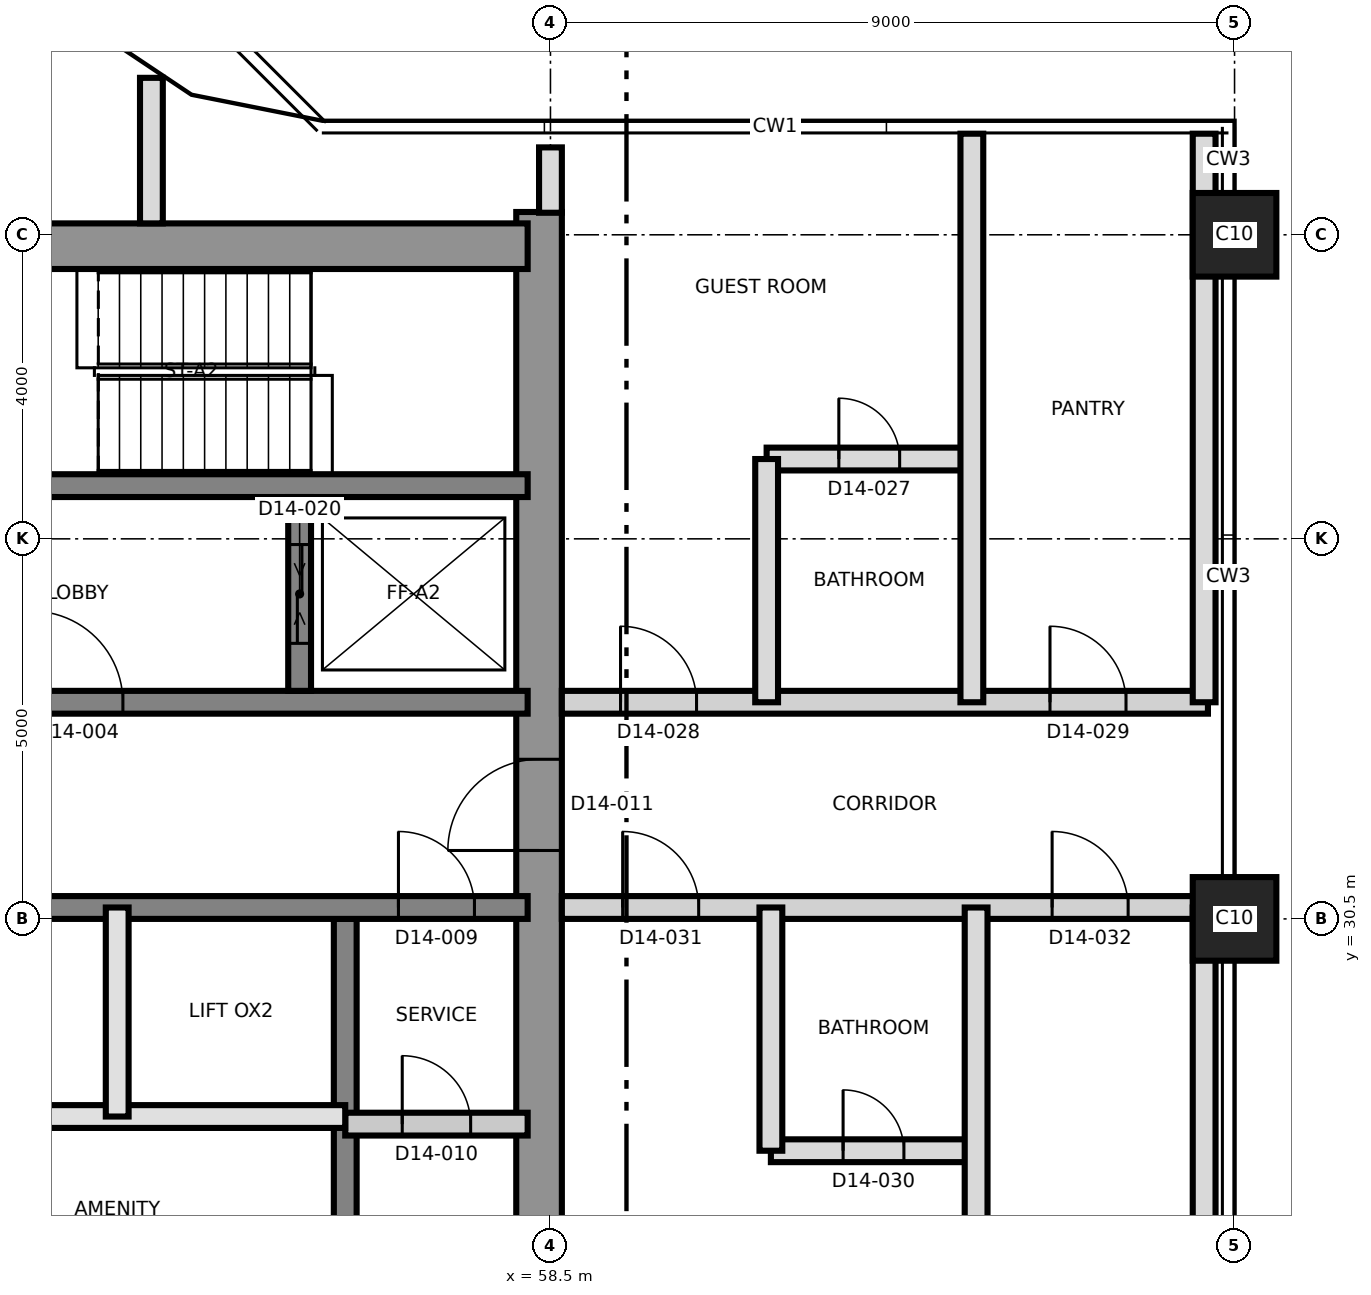
"""IFC4 building model, lengths in metres.
Left out: names, types, materials, properties, quantities, classifications, styles, units other than length and angle.
Written with IfcOpenShell. Run it as: python <this file> out.ifc"""

import sys

from ifc_helpers import new_model, si_unit, direction, frame, frame_2d, origin, origin_2d, place, context, subcontext, project, spatial, rectangle, extrude, element, fill, save


model = new_model("IFC4")
c1 = context("Model", 3, precision=1e-05, world=origin(), true_north=direction((0.0, 1.0)))
c2 = subcontext(c1, "Body", "Model", "MODEL_VIEW")
j1 = project(units=[si_unit("LENGTHUNIT", "METRE"), si_unit("PLANEANGLEUNIT", "RADIAN")], contexts=[c1])
p1 = place(None, origin())
s1 = spatial("IfcSite", under=j1, at=p1, CompositionType="ELEMENT")
p2 = place(p1, origin())
s2 = spatial("IfcBuilding", under=s1, at=p2, CompositionType="ELEMENT")
p3 = place(p2, frame((0.0, 0.0, 149.6)))
s3 = spatial("IfcBuildingStorey", under=s2, at=p3, CompositionType="ELEMENT", Elevation=149.6)
p4 = place(p3, frame((58.35, 21.2, 0.0), z_axis=(0.0, 0.0, 1.0), x_axis=(0.0, 1.0, 0.0)))
e1 = element("IfcWall", 1, at=p4, inside=s3, PredefinedType="SHEAR", context=c2, shape_type="SweptSolid", body=[
    extrude(rectangle(XDim=18.6, YDim=0.6, at=frame_2d((9.3, 0.0))), origin(), (0.0, 0.0, 1.0), 3.7),
])
p5 = place(p4, frame((10.2, 0.0, 0.0)))
e2 = element("IfcOpeningElement", 2, at=p5, cuts=e1, PredefinedType="OPENING", context=c2, shape_type="SweptSolid", body=[
    extrude(rectangle(XDim=1.2, YDim=2.1, at=frame_2d((0.6, 1.05))), frame((0.0, 0.31, 0.0), z_axis=(0.0, -1.0, 0.0), x_axis=(1.0, 0.0, 0.0)), (0.0, 0.0, 1.0), 0.62),
])
p6 = place(p3, frame((31.2, 39.35, 0.0), z_axis=(0.0, 0.0, 1.0), x_axis=(1.0, 0.0, 0.0)))
e3 = element("IfcWall", 3, at=p6, inside=s3, PredefinedType="SHEAR", context=c2, shape_type="SweptSolid", body=[
    extrude(rectangle(XDim=27.0, YDim=0.6, at=frame_2d((13.5, 0.0))), origin(), (0.0, 0.0, 1.0), 3.7),
])
p7 = place(p6, frame((10.5, 0.0, 0.0)))
e4 = element("IfcOpeningElement", 4, at=p7, cuts=e3, PredefinedType="OPENING", context=c2, shape_type="SweptSolid", body=[
    extrude(rectangle(XDim=1.2, YDim=2.1, at=frame_2d((0.6, 1.05))), frame((0.0, 0.31, 0.0), z_axis=(0.0, -1.0, 0.0), x_axis=(1.0, 0.0, 0.0)), (0.0, 0.0, 1.0), 0.62),
])
p8 = place(p3, frame((55.8, 21.8, 0.0), z_axis=(0.0, 0.0, 1.0), x_axis=(0.0, 1.0, 0.0)))
e5 = element("IfcWall", 5, at=p8, inside=s3, PredefinedType="SHEAR", context=c2, shape_type="SweptSolid", body=[
    extrude(rectangle(XDim=8.7, YDim=0.3, at=frame_2d((4.35, 0.0))), origin(), (0.0, 0.0, 1.0), 3.7),
])
p9 = place(p3, frame((31.8, 30.65, 0.0), z_axis=(0.0, 0.0, 1.0), x_axis=(1.0, 0.0, 0.0)))
e6 = element("IfcWall", 6, at=p9, inside=s3, PredefinedType="SHEAR", context=c2, shape_type="SweptSolid", body=[
    extrude(rectangle(XDim=26.4, YDim=0.3, at=frame_2d((13.2, 0.0))), origin(), (0.0, 0.0, 1.0), 3.7),
])
p10 = place(p9, frame((24.7, 0.0, 0.0)))
e7 = element("IfcOpeningElement", 7, at=p10, cuts=e6, PredefinedType="OPENING", context=c2, shape_type="SweptSolid", body=[
    extrude(rectangle(XDim=1.0, YDim=2.1, at=frame_2d((0.5, 1.05))), frame((0.0, 0.16, 0.0), z_axis=(0.0, -1.0, 0.0), x_axis=(1.0, 0.0, 0.0)), (0.0, 0.0, 1.0), 0.32),
])
p11 = place(p9, frame((4.0, 0.0, 0.0)))
e8 = element("IfcOpeningElement", 8, at=p11, cuts=e6, PredefinedType="OPENING", context=c2, shape_type="SweptSolid", body=[
    extrude(rectangle(XDim=1.0, YDim=2.1, at=frame_2d((0.5, 1.05))), frame((0.0, 0.16, 0.0), z_axis=(0.0, -1.0, 0.0), x_axis=(1.0, 0.0, 0.0)), (0.0, 0.0, 1.0), 0.32),
])
p12 = place(p3, frame((31.8, 33.35, 0.0), z_axis=(0.0, 0.0, 1.0), x_axis=(1.0, 0.0, 0.0)))
e9 = element("IfcWall", 9, at=p12, inside=s3, PredefinedType="SHEAR", context=c2, shape_type="SweptSolid", body=[
    extrude(rectangle(XDim=26.4, YDim=0.3, at=frame_2d((13.2, 0.0))), origin(), (0.0, 0.0, 1.0), 3.7),
])
p13 = place(p12, frame((13.85, 0.0, 0.0)))
e10 = element("IfcOpeningElement", 10, at=p13, cuts=e9, PredefinedType="OPENING", context=c2, shape_type="SweptSolid", body=[
    extrude(rectangle(XDim=1.4, YDim=2.1, at=frame_2d((0.7, 1.05))), frame((0.0, 0.16, 0.0), z_axis=(0.0, -1.0, 0.0), x_axis=(1.0, 0.0, 0.0)), (0.0, 0.0, 1.0), 0.32),
])
p14 = place(p12, frame((5.325, 0.0, 0.0)))
e11 = element("IfcOpeningElement", 11, at=p14, cuts=e9, PredefinedType="OPENING", context=c2, shape_type="SweptSolid", body=[
    extrude(rectangle(XDim=1.2, YDim=2.1, at=frame_2d((0.6, 1.05))), frame((0.0, 0.16, 0.0), z_axis=(0.0, -1.0, 0.0), x_axis=(1.0, 0.0, 0.0)), (0.0, 0.0, 1.0), 0.32),
])
p15 = place(p12, frame((19.875, 0.0, 0.0)))
e12 = element("IfcOpeningElement", 12, at=p15, cuts=e9, PredefinedType="OPENING", context=c2, shape_type="SweptSolid", body=[
    extrude(rectangle(XDim=1.2, YDim=2.1, at=frame_2d((0.6, 1.05))), frame((0.0, 0.16, 0.0), z_axis=(0.0, -1.0, 0.0), x_axis=(1.0, 0.0, 0.0)), (0.0, 0.0, 1.0), 0.32),
])
p16 = place(p3, frame((43.5, 36.2, 0.0), z_axis=(0.0, 0.0, 1.0), x_axis=(1.0, 0.0, 0.0)))
e13 = element("IfcWall", 13, at=p16, inside=s3, PredefinedType="SHEAR", context=c2, shape_type="SweptSolid", body=[
    extrude(rectangle(XDim=14.7, YDim=0.3, at=frame_2d((7.35, 0.0))), origin(), (0.0, 0.0, 1.0), 3.7),
])
p17 = place(p16, frame((6.9, 0.0, 0.0)))
e14 = element("IfcOpeningElement", 14, at=p17, cuts=e13, PredefinedType="OPENING", context=c2, shape_type="SweptSolid", body=[
    extrude(rectangle(XDim=1.2, YDim=2.1, at=frame_2d((0.6, 1.05))), frame((0.0, 0.16, 0.0), z_axis=(0.0, -1.0, 0.0), x_axis=(1.0, 0.0, 0.0)), (0.0, 0.0, 1.0), 0.32),
])
p18 = place(p16, frame((0.7, 0.0, 0.0)))
e15 = element("IfcOpeningElement", 15, at=p18, cuts=e13, PredefinedType="OPENING", context=c2, shape_type="SweptSolid", body=[
    extrude(rectangle(XDim=1.3, YDim=2.4, at=frame_2d((0.65, 1.2))), frame((0.0, 0.16, 0.0), z_axis=(0.0, -1.0, 0.0), x_axis=(1.0, 0.0, 0.0)), (0.0, 0.0, 1.0), 0.32),
])
p19 = place(p16, frame((3.7, 0.0, 0.0)))
e16 = element("IfcOpeningElement", 16, at=p19, cuts=e13, PredefinedType="OPENING", context=c2, shape_type="SweptSolid", body=[
    extrude(rectangle(XDim=1.3, YDim=2.4, at=frame_2d((0.65, 1.2))), frame((0.0, 0.16, 0.0), z_axis=(0.0, -1.0, 0.0), x_axis=(1.0, 0.0, 0.0)), (0.0, 0.0, 1.0), 0.32),
])
p20 = place(p3, frame((55.2, 33.5, 0.0), z_axis=(0.0, 0.0, 1.0), x_axis=(0.0, 1.0, 0.0)))
e17 = element("IfcWall", 17, at=p20, inside=s3, PredefinedType="SHEAR", context=c2, shape_type="SweptSolid", body=[
    extrude(rectangle(XDim=2.55, YDim=0.3, at=frame_2d((1.275, 0.0))), origin(), (0.0, 0.0, 1.0), 3.7),
])
p21 = place(p20, frame((0.625, 0.0, 0.0)))
e18 = element("IfcOpeningElement", 18, at=p21, cuts=e17, PredefinedType="OPENING", context=c2, shape_type="SweptSolid", body=[
    extrude(rectangle(XDim=1.3, YDim=2.4, at=frame_2d((0.65, 1.2))), frame((0.0, 0.16, 0.0), z_axis=(0.0, -1.0, 0.0), x_axis=(1.0, 0.0, 0.0)), (0.0, 0.0, 1.0), 0.32),
])
for number, where, z_axis, x_axis in (
    (19, (67.5, 30.5, 0.0), (0.0, 0.0, 1.0), (1.0, 0.0, 0.0)),
    (20, (67.5, 39.5, 0.0), (0.0, 0.0, 1.0), (1.0, 0.0, 0.0)),
):
    element("IfcColumn", number, at=place(p3, frame(where, z_axis=z_axis, x_axis=x_axis)), inside=s3, PredefinedType="COLUMN", context=c2, shape_type="SweptSolid", body=[
        extrude(rectangle(XDim=1.1, YDim=1.1, at=origin_2d()), origin(), (0.0, 0.0, 1.0), 3.7),
    ])
p22 = place(p3, frame((55.8, 27.8, 0.0), z_axis=(0.0, 0.0, 1.0), x_axis=(1.0, 0.0, 0.0)))
e21 = element("IfcWall", 21, at=p22, inside=s3, PredefinedType="PARTITIONING", context=c2, shape_type="SweptSolid", body=[
    extrude(rectangle(XDim=2.4, YDim=0.3, at=frame_2d((1.2, 0.0))), origin(), (0.0, 0.0, 1.0), 3.4),
])
p23 = place(p22, frame((0.75, 0.0, 0.0)))
e22 = element("IfcOpeningElement", 22, at=p23, cuts=e21, PredefinedType="OPENING", context=c2, shape_type="SweptSolid", body=[
    extrude(rectangle(XDim=0.9, YDim=2.1, at=frame_2d((0.45, 1.05))), frame((0.0, 0.16, 0.0), z_axis=(0.0, -1.0, 0.0), x_axis=(1.0, 0.0, 0.0)), (0.0, 0.0, 1.0), 0.32),
])
p24 = place(p3, frame((49.8, 27.9, 0.0), z_axis=(0.0, 0.0, 1.0), x_axis=(1.0, 0.0, 0.0)))
e23 = element("IfcWall", 23, at=p24, inside=s3, PredefinedType="SOLIDWALL", context=c2, shape_type="SweptSolid", body=[
    extrude(rectangle(XDim=6.0, YDim=0.3, at=frame_2d((3.0, 0.0))), origin(), (0.0, 0.0, 1.0), 3.4),
])
p25 = place(p3, frame((52.8, 27.9, 0.0), z_axis=(0.0, 0.0, 1.0), x_axis=(0.0, 1.0, 0.0)))
e24 = element("IfcWall", 24, at=p25, inside=s3, PredefinedType="SOLIDWALL", context=c2, shape_type="SweptSolid", body=[
    extrude(rectangle(XDim=2.75, YDim=0.3, at=frame_2d((1.375, 0.0))), origin(), (0.0, 0.0, 1.0), 3.4),
])
p26 = place(p3, frame((61.4, 27.45, 0.0), z_axis=(0.0, 0.0, 1.0), x_axis=(1.0, 0.0, 0.0)))
e25 = element("IfcWall", 25, at=p26, inside=s3, PredefinedType="PARTITIONING", context=c2, shape_type="SweptSolid", body=[
    extrude(rectangle(XDim=2.7, YDim=0.3, at=frame_2d((1.35, 0.0))), origin(), (0.0, 0.0, 1.0), 3.4),
])
p27 = place(p26, frame((0.95, 0.0, 0.0)))
e26 = element("IfcOpeningElement", 26, at=p27, cuts=e25, PredefinedType="OPENING", context=c2, shape_type="SweptSolid", body=[
    extrude(rectangle(XDim=0.8, YDim=2.1, at=frame_2d((0.4, 1.05))), frame((0.0, 0.16, 0.0), z_axis=(0.0, -1.0, 0.0), x_axis=(1.0, 0.0, 0.0)), (0.0, 0.0, 1.0), 0.32),
])
p28 = place(p3, frame((58.65, 30.65, 0.0), z_axis=(0.0, 0.0, 1.0), x_axis=(1.0, 0.0, 0.0)))
e27 = element("IfcWall", 27, at=p28, inside=s3, PredefinedType="PARTITIONING", context=c2, shape_type="SweptSolid", body=[
    extrude(rectangle(XDim=8.5, YDim=0.3, at=frame_2d((4.25, 0.0))), origin(), (0.0, 0.0, 1.0), 3.4),
])
p29 = place(p28, frame((0.8, 0.0, 0.0)))
e28 = element("IfcOpeningElement", 28, at=p29, cuts=e27, PredefinedType="OPENING", context=c2, shape_type="SweptSolid", body=[
    extrude(rectangle(XDim=1.0, YDim=2.1, at=frame_2d((0.5, 1.05))), frame((0.0, 0.16, 0.0), z_axis=(0.0, -1.0, 0.0), x_axis=(1.0, 0.0, 0.0)), (0.0, 0.0, 1.0), 0.32),
])
p30 = place(p28, frame((6.45, 0.0, 0.0)))
e29 = element("IfcOpeningElement", 29, at=p30, cuts=e27, PredefinedType="OPENING", context=c2, shape_type="SweptSolid", body=[
    extrude(rectangle(XDim=1.0, YDim=2.1, at=frame_2d((0.5, 1.05))), frame((0.0, 0.16, 0.0), z_axis=(0.0, -1.0, 0.0), x_axis=(1.0, 0.0, 0.0)), (0.0, 0.0, 1.0), 0.32),
])
p31 = place(p3, frame((58.65, 33.35, 0.0), z_axis=(0.0, 0.0, 1.0), x_axis=(1.0, 0.0, 0.0)))
e30 = element("IfcWall", 30, at=p31, inside=s3, PredefinedType="PARTITIONING", context=c2, shape_type="SweptSolid", body=[
    extrude(rectangle(XDim=8.5, YDim=0.3, at=frame_2d((4.25, 0.0))), origin(), (0.0, 0.0, 1.0), 3.4),
])
p32 = place(p31, frame((0.772, 0.0, 0.0)))
e31 = element("IfcOpeningElement", 31, at=p32, cuts=e30, PredefinedType="OPENING", context=c2, shape_type="SweptSolid", body=[
    extrude(rectangle(XDim=1.0, YDim=2.1, at=frame_2d((0.5, 1.05))), frame((0.0, 0.16, 0.0), z_axis=(0.0, -1.0, 0.0), x_axis=(1.0, 0.0, 0.0)), (0.0, 0.0, 1.0), 0.32),
])
p33 = place(p31, frame((6.422, 0.0, 0.0)))
e32 = element("IfcOpeningElement", 32, at=p33, cuts=e30, PredefinedType="OPENING", context=c2, shape_type="SweptSolid", body=[
    extrude(rectangle(XDim=1.0, YDim=2.1, at=frame_2d((0.5, 1.05))), frame((0.0, 0.16, 0.0), z_axis=(0.0, -1.0, 0.0), x_axis=(1.0, 0.0, 0.0)), (0.0, 0.0, 1.0), 0.32),
])
p34 = place(p3, frame((61.344, 36.55, 0.0), z_axis=(0.0, 0.0, 1.0), x_axis=(1.0, 0.0, 0.0)))
e33 = element("IfcWall", 33, at=p34, inside=s3, PredefinedType="PARTITIONING", context=c2, shape_type="SweptSolid", body=[
    extrude(rectangle(XDim=2.7, YDim=0.3, at=frame_2d((1.35, 0.0))), origin(), (0.0, 0.0, 1.0), 3.4),
])
p35 = place(p34, frame((0.95, 0.0, 0.0)))
e34 = element("IfcOpeningElement", 34, at=p35, cuts=e33, PredefinedType="OPENING", context=c2, shape_type="SweptSolid", body=[
    extrude(rectangle(XDim=0.8, YDim=2.1, at=frame_2d((0.4, 1.05))), frame((0.0, 0.16, 0.0), z_axis=(0.0, -1.0, 0.0), x_axis=(1.0, 0.0, 0.0)), (0.0, 0.0, 1.0), 0.32),
])
p36 = place(p3, frame((53.25, 39.65, 0.0), z_axis=(0.0, 0.0, 1.0), x_axis=(0.0, 1.0, 0.0)))
e35 = element("IfcWall", 35, at=p36, inside=s3, PredefinedType="PARTITIONING", context=c2, shape_type="SweptSolid", body=[
    extrude(rectangle(XDim=1.915, YDim=0.3, at=frame_2d((0.958, 0.0))), origin(), (0.0, 0.0, 1.0), 3.35),
])
p37 = place(p3, frame((58.5, 39.79, 0.0), z_axis=(0.0, 0.0, 1.0), x_axis=(0.0, 1.0, 0.0)))
e36 = element("IfcWall", 36, at=p37, inside=s3, PredefinedType="PARTITIONING", context=c2, shape_type="SweptSolid", body=[
    extrude(rectangle(XDim=0.86, YDim=0.3, at=frame_2d((0.43, 0.0))), origin(), (0.0, 0.0, 1.0), 3.35),
])
for number, where, z_axis, x_axis in (
    (37, (61.344, 33.35, 0.0), (0.0, 0.0, 1.0), (0.0, 1.0, 0.0)),
    (38, (61.4, 27.45, 0.0), (0.0, 0.0, 1.0), (0.0, 1.0, 0.0)),
):
    element("IfcWall", number, at=place(p3, frame(where, z_axis=z_axis, x_axis=x_axis)), inside=s3, PredefinedType="PARTITIONING", context=c2, shape_type="SweptSolid", body=[
        extrude(rectangle(XDim=3.2, YDim=0.3, at=frame_2d((1.6, 0.0))), origin(), (0.0, 0.0, 1.0), 3.4),
    ])
p38 = place(p3, frame((64.044, 33.35, 0.0), z_axis=(0.0, 0.0, 1.0), x_axis=(0.0, 1.0, 0.0)))
e39 = element("IfcWall", 39, at=p38, inside=s3, PredefinedType="PARTITIONING", context=c2, shape_type="SweptSolid", body=[
    extrude(rectangle(XDim=7.48, YDim=0.3, at=frame_2d((3.74, 0.0))), origin(), (0.0, 0.0, 1.0), 3.35),
])
for number, where, z_axis, x_axis in (
    (40, (64.1, 20.35, 0.0), (0.0, 0.0, 1.0), (0.0, 1.0, 0.0)),
    (41, (67.1, 20.35, 0.0), (0.0, 0.0, 1.0), (0.0, 1.0, 0.0)),
):
    element("IfcWall", number, at=place(p3, frame(where, z_axis=z_axis, x_axis=x_axis)), inside=s3, PredefinedType="PARTITIONING", context=c2, shape_type="SweptSolid", body=[
        extrude(rectangle(XDim=10.3, YDim=0.3, at=frame_2d((5.15, 0.0))), origin(), (0.0, 0.0, 1.0), 3.35),
    ])
p39 = place(p3, frame((67.1, 33.35, 0.0), z_axis=(0.0, 0.0, 1.0), x_axis=(0.0, 1.0, 0.0)))
e42 = element("IfcWall", 42, at=p39, inside=s3, PredefinedType="PARTITIONING", context=c2, shape_type="SweptSolid", body=[
    extrude(rectangle(XDim=7.48, YDim=0.3, at=frame_2d((3.74, 0.0))), origin(), (0.0, 0.0, 1.0), 3.35),
])
p40 = place(p15, origin())
e43 = element("IfcDoor", 43, at=p40, inside=s3, OperationType="SINGLE_SWING_RIGHT", PredefinedType="DOOR", context=c2, shape_type="SweptSolid", body=[
    extrude(rectangle(XDim=1.2, YDim=2.1, at=frame_2d((0.6, 1.05))), frame((0.0, 0.025, 0.0), z_axis=(0.0, -1.0, 0.0), x_axis=(1.0, 0.0, 0.0)), (0.0, 0.0, 1.0), 0.05),
])
fill(e12, e43)
p41 = place(p10, origin())
e44 = element("IfcDoor", 44, at=p41, inside=s3, OperationType="SINGLE_SWING_LEFT", PredefinedType="DOOR", context=c2, shape_type="SweptSolid", body=[
    extrude(rectangle(XDim=1.0, YDim=2.1, at=frame_2d((0.5, 1.05))), frame((0.0, 0.025, 0.0), z_axis=(0.0, -1.0, 0.0), x_axis=(1.0, 0.0, 0.0)), (0.0, 0.0, 1.0), 0.05),
])
fill(e7, e44)
p42 = place(p23, origin())
e45 = element("IfcDoor", 45, at=p42, inside=s3, OperationType="SINGLE_SWING_RIGHT", PredefinedType="DOOR", context=c2, shape_type="SweptSolid", body=[
    extrude(rectangle(XDim=0.9, YDim=2.1, at=frame_2d((0.45, 1.05))), frame((0.0, 0.025, 0.0), z_axis=(0.0, -1.0, 0.0), x_axis=(1.0, 0.0, 0.0)), (0.0, 0.0, 1.0), 0.05),
])
fill(e22, e45)
p43 = place(p5, origin())
e46 = element("IfcDoor", 46, at=p43, inside=s3, OperationType="SINGLE_SWING_LEFT", PredefinedType="DOOR", context=c2, shape_type="SweptSolid", body=[
    extrude(rectangle(XDim=1.2, YDim=2.1, at=frame_2d((0.6, 1.05))), frame((0.0, 0.025, 0.0), z_axis=(0.0, -1.0, 0.0), x_axis=(1.0, 0.0, 0.0)), (0.0, 0.0, 1.0), 0.05),
])
fill(e2, e46)
p44 = place(p21, origin())
e47 = element("IfcDoor", 47, at=p44, inside=s3, OperationType="SLIDING_TO_LEFT", PredefinedType="DOOR", context=c2, shape_type="SweptSolid", body=[
    extrude(rectangle(XDim=1.3, YDim=2.4, at=frame_2d((0.65, 1.2))), frame((0.0, 0.025, 0.0), z_axis=(0.0, -1.0, 0.0), x_axis=(1.0, 0.0, 0.0)), (0.0, 0.0, 1.0), 0.05),
])
fill(e18, e47)
p45 = place(p35, origin())
e48 = element("IfcDoor", 48, at=p45, inside=s3, OperationType="SINGLE_SWING_LEFT", PredefinedType="DOOR", context=c2, shape_type="SweptSolid", body=[
    extrude(rectangle(XDim=0.8, YDim=2.1, at=frame_2d((0.4, 1.05))), frame((0.0, 0.025, 0.0), z_axis=(0.0, -1.0, 0.0), x_axis=(1.0, 0.0, 0.0)), (0.0, 0.0, 1.0), 0.05),
])
fill(e34, e48)
p46 = place(p32, origin())
e49 = element("IfcDoor", 49, at=p46, inside=s3, OperationType="SINGLE_SWING_LEFT", PredefinedType="DOOR", context=c2, shape_type="SweptSolid", body=[
    extrude(rectangle(XDim=1.0, YDim=2.1, at=frame_2d((0.5, 1.05))), frame((0.0, 0.025, 0.0), z_axis=(0.0, -1.0, 0.0), x_axis=(1.0, 0.0, 0.0)), (0.0, 0.0, 1.0), 0.05),
])
fill(e31, e49)
p47 = place(p33, origin())
e50 = element("IfcDoor", 50, at=p47, inside=s3, OperationType="SINGLE_SWING_RIGHT", PredefinedType="DOOR", context=c2, shape_type="SweptSolid", body=[
    extrude(rectangle(XDim=1.0, YDim=2.1, at=frame_2d((0.5, 1.05))), frame((0.0, 0.025, 0.0), z_axis=(0.0, -1.0, 0.0), x_axis=(1.0, 0.0, 0.0)), (0.0, 0.0, 1.0), 0.05),
])
fill(e32, e50)
p48 = place(p27, origin())
e51 = element("IfcDoor", 51, at=p48, inside=s3, OperationType="SINGLE_SWING_LEFT", PredefinedType="DOOR", context=c2, shape_type="SweptSolid", body=[
    extrude(rectangle(XDim=0.8, YDim=2.1, at=frame_2d((0.4, 1.05))), frame((0.0, 0.025, 0.0), z_axis=(0.0, -1.0, 0.0), x_axis=(1.0, 0.0, 0.0)), (0.0, 0.0, 1.0), 0.05),
])
fill(e26, e51)
p49 = place(p29, origin())
e52 = element("IfcDoor", 52, at=p49, inside=s3, OperationType="SINGLE_SWING_LEFT", PredefinedType="DOOR", context=c2, shape_type="SweptSolid", body=[
    extrude(rectangle(XDim=1.0, YDim=2.1, at=frame_2d((0.5, 1.05))), frame((0.0, 0.025, 0.0), z_axis=(0.0, -1.0, 0.0), x_axis=(1.0, 0.0, 0.0)), (0.0, 0.0, 1.0), 0.05),
])
fill(e28, e52)
p50 = place(p30, origin())
e53 = element("IfcDoor", 53, at=p50, inside=s3, OperationType="SINGLE_SWING_RIGHT", PredefinedType="DOOR", context=c2, shape_type="SweptSolid", body=[
    extrude(rectangle(XDim=1.0, YDim=2.1, at=frame_2d((0.5, 1.05))), frame((0.0, 0.025, 0.0), z_axis=(0.0, -1.0, 0.0), x_axis=(1.0, 0.0, 0.0)), (0.0, 0.0, 1.0), 0.05),
])
fill(e29, e53)
save(model, sys.argv[1])
